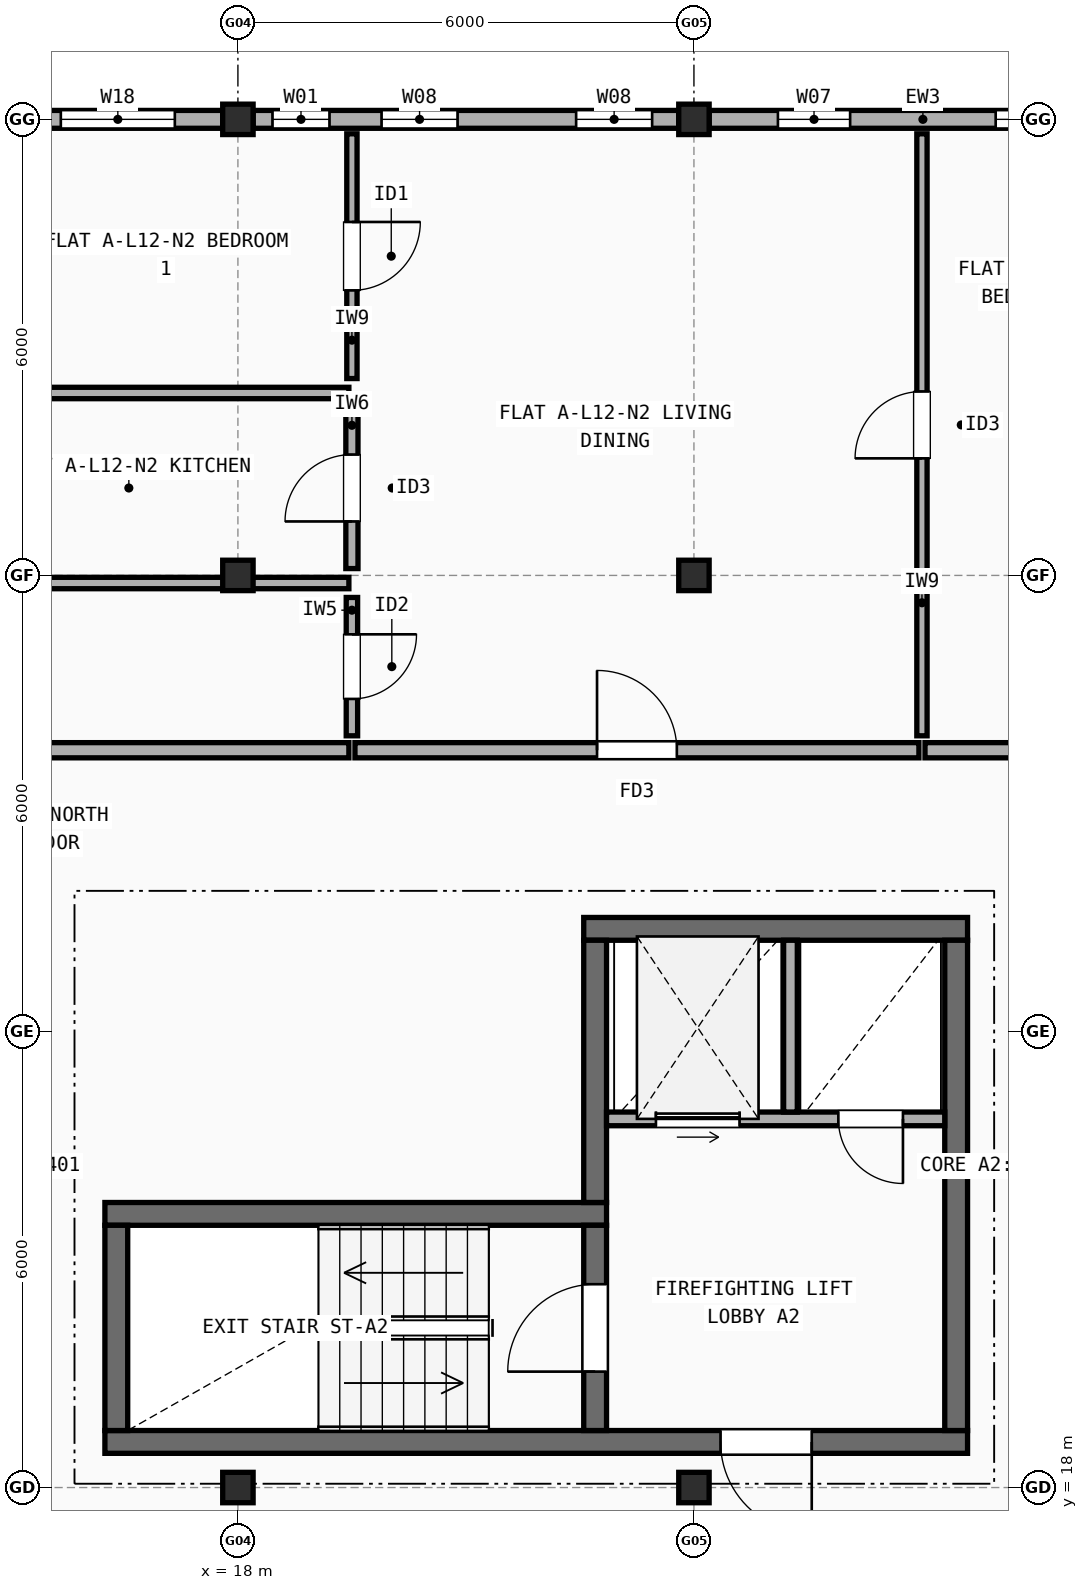
"""IFC4 building model, lengths in metres.
Left out: names, types, materials, properties, quantities, classifications, styles, units other than length and angle.
Written with IfcOpenShell. Run it as: python <this file> out.ifc"""

import sys

from ifc_helpers import new_model, si_unit, direction, frame, frame_2d, origin, origin_2d, place, context, subcontext, project, spatial, rectangle, extrude, element, fill, save


model = new_model("IFC4")
c1 = context("Model", 3, precision=1e-05, world=origin(), true_north=direction((0.0, 1.0)))
c2 = subcontext(c1, "Body", "Model", "MODEL_VIEW")
j1 = project(units=[si_unit("LENGTHUNIT", "METRE"), si_unit("PLANEANGLEUNIT", "RADIAN")], contexts=[c1])
p1 = place(None, origin())
s1 = spatial("IfcSite", under=j1, at=p1, CompositionType="ELEMENT")
p2 = place(p1, origin())
s2 = spatial("IfcBuilding", under=s1, at=p2, CompositionType="ELEMENT")
p3 = place(p2, frame((0.0, 0.0, 39.7)))
s3 = spatial("IfcBuildingStorey", under=s2, at=p3, CompositionType="ELEMENT", Elevation=39.7)
for number, where, z_axis, x_axis in (
    (1, (18.0, 18.0, 0.0), (0.0, 0.0, 1.0), (1.0, 0.0, 0.0)),
    (2, (18.0, 30.0, 0.0), (0.0, 0.0, 1.0), (1.0, 0.0, 0.0)),
    (3, (18.0, 36.0, 0.0), (0.0, 0.0, 1.0), (1.0, 0.0, 0.0)),
    (4, (24.0, 18.0, 0.0), (0.0, 0.0, 1.0), (1.0, 0.0, 0.0)),
    (5, (24.0, 30.0, 0.0), (0.0, 0.0, 1.0), (1.0, 0.0, 0.0)),
    (6, (24.0, 36.0, 0.0), (0.0, 0.0, 1.0), (1.0, 0.0, 0.0)),
):
    element("IfcColumn", number, at=place(p3, frame(where, z_axis=z_axis, x_axis=x_axis)), inside=s3, PredefinedType="COLUMN", context=c2, shape_type="SweptSolid", body=[
        extrude(rectangle(XDim=0.4, YDim=0.4, at=origin_2d()), origin(), (0.0, 0.0, 1.0), 3.0),
    ])
p4 = place(p3, frame((29.8, 36.0, 0.0), z_axis=(0.0, 0.0, 1.0), x_axis=(-1.0, 0.0, 0.0)))
e7 = element("IfcWall", 7, at=p4, inside=s3, PredefinedType="STANDARD", context=c2, shape_type="SweptSolid", body=[
    extrude(rectangle(XDim=5.6, YDim=0.235, at=frame_2d((2.8, 0.0))), origin(), (0.0, 0.0, 1.0), 2.482),
])
p5 = place(p4, frame((0.93, 0.0, 0.9)))
e8 = element("IfcOpeningElement", 8, at=p5, cuts=e7, PredefinedType="OPENING", context=c2, shape_type="SweptSolid", body=[
    extrude(rectangle(XDim=0.9, YDim=1.4, at=frame_2d((0.45, 0.7))), frame((0.0, 0.127, 0.0), z_axis=(0.0, -1.0, 0.0), x_axis=(1.0, 0.0, 0.0)), (0.0, 0.0, 1.0), 0.255),
])
p6 = place(p4, frame((3.745, 0.0, 0.9)))
e9 = element("IfcOpeningElement", 9, at=p6, cuts=e7, PredefinedType="OPENING", context=c2, shape_type="SweptSolid", body=[
    extrude(rectangle(XDim=0.95, YDim=1.35, at=frame_2d((0.475, 0.675))), frame((0.0, 0.127, 0.0), z_axis=(0.0, -1.0, 0.0), x_axis=(1.0, 0.0, 0.0)), (0.0, 0.0, 1.0), 0.255),
])
p7 = place(p3, frame((23.8, 36.0, 0.0), z_axis=(0.0, 0.0, 1.0), x_axis=(-1.0, 0.0, 0.0)))
e10 = element("IfcWall", 10, at=p7, inside=s3, PredefinedType="STANDARD", context=c2, shape_type="SweptSolid", body=[
    extrude(rectangle(XDim=5.6, YDim=0.235, at=frame_2d((2.8, 0.0))), origin(), (0.0, 0.0, 1.0), 2.482),
])
p8 = place(p7, frame((0.35, 0.0, 0.9)))
e11 = element("IfcOpeningElement", 11, at=p8, cuts=e10, PredefinedType="OPENING", context=c2, shape_type="SweptSolid", body=[
    extrude(rectangle(XDim=1.0, YDim=1.4, at=frame_2d((0.5, 0.7))), frame((0.0, 0.127, 0.0), z_axis=(0.0, -1.0, 0.0), x_axis=(1.0, 0.0, 0.0)), (0.0, 0.0, 1.0), 0.255),
])
p9 = place(p7, frame((2.91, 0.0, 0.9)))
e12 = element("IfcOpeningElement", 12, at=p9, cuts=e10, PredefinedType="OPENING", context=c2, shape_type="SweptSolid", body=[
    extrude(rectangle(XDim=1.0, YDim=1.4, at=frame_2d((0.5, 0.7))), frame((0.0, 0.127, 0.0), z_axis=(0.0, -1.0, 0.0), x_axis=(1.0, 0.0, 0.0)), (0.0, 0.0, 1.0), 0.255),
])
p10 = place(p7, frame((4.595, 0.0, 0.9)))
e13 = element("IfcOpeningElement", 13, at=p10, cuts=e10, PredefinedType="OPENING", context=c2, shape_type="SweptSolid", body=[
    extrude(rectangle(XDim=0.75, YDim=1.15, at=frame_2d((0.375, 0.575))), frame((0.0, 0.127, 0.0), z_axis=(0.0, -1.0, 0.0), x_axis=(1.0, 0.0, 0.0)), (0.0, 0.0, 1.0), 0.255),
])
p11 = place(p3, frame((17.8, 36.0, 0.0), z_axis=(0.0, 0.0, 1.0), x_axis=(-1.0, 0.0, 0.0)))
e14 = element("IfcWall", 14, at=p11, inside=s3, PredefinedType="STANDARD", context=c2, shape_type="SweptSolid", body=[
    extrude(rectangle(XDim=5.6, YDim=0.235, at=frame_2d((2.8, 0.0))), origin(), (0.0, 0.0, 1.0), 2.482),
])
p12 = place(p11, frame((0.63, 0.0, 0.9)))
e15 = element("IfcOpeningElement", 15, at=p12, cuts=e14, PredefinedType="OPENING", context=c2, shape_type="SweptSolid", body=[
    extrude(rectangle(XDim=1.5, YDim=1.4, at=frame_2d((0.75, 0.7))), frame((0.0, 0.127, 0.0), z_axis=(0.0, -1.0, 0.0), x_axis=(1.0, 0.0, 0.0)), (0.0, 0.0, 1.0), 0.255),
])
p13 = place(p11, frame((3.77, 0.0, 0.9)))
e16 = element("IfcOpeningElement", 16, at=p13, cuts=e14, PredefinedType="OPENING", context=c2, shape_type="SweptSolid", body=[
    extrude(rectangle(XDim=0.9, YDim=1.4, at=frame_2d((0.45, 0.7))), frame((0.0, 0.127, 0.0), z_axis=(0.0, -1.0, 0.0), x_axis=(1.0, 0.0, 0.0)), (0.0, 0.0, 1.0), 0.255),
])
p14 = place(p3, frame((16.25, 18.6, 0.0), z_axis=(0.0, 0.0, 1.0), x_axis=(1.0, 0.0, 0.0)))
e17 = element("IfcWall", 17, at=p14, inside=s3, PredefinedType="SHEAR", context=c2, shape_type="SweptSolid", body=[
    extrude(rectangle(XDim=11.35, YDim=0.3, at=frame_2d((5.675, 0.0))), origin(), (0.0, 0.0, 1.0), 3.0),
])
p15 = place(p14, frame((8.1, 0.0, 0.0)))
e18 = element("IfcOpeningElement", 18, at=p15, cuts=e17, PredefinedType="OPENING", context=c2, shape_type="SweptSolid", body=[
    extrude(rectangle(XDim=1.2, YDim=2.15, at=frame_2d((0.6, 1.075))), frame((0.0, 0.16, 0.0), z_axis=(0.0, -1.0, 0.0), x_axis=(1.0, 0.0, 0.0)), (0.0, 0.0, 1.0), 0.32),
])
p16 = place(p3, frame((22.85, 21.6, 0.0), z_axis=(0.0, 0.0, 1.0), x_axis=(-1.0, 0.0, 0.0)))
e19 = element("IfcWall", 19, at=p16, inside=s3, PredefinedType="SHEAR", context=c2, shape_type="SweptSolid", body=[
    extrude(rectangle(XDim=6.6, YDim=0.3, at=frame_2d((3.3, 0.0))), origin(), (0.0, 0.0, 1.0), 3.0),
])
p17 = place(p3, frame((16.4, 21.45, 0.0), z_axis=(0.0, 0.0, 1.0), x_axis=(0.0, -1.0, 0.0)))
e20 = element("IfcWall", 20, at=p17, inside=s3, PredefinedType="SHEAR", context=c2, shape_type="SweptSolid", body=[
    extrude(rectangle(XDim=2.7, YDim=0.3, at=frame_2d((1.35, 0.0))), origin(), (0.0, 0.0, 1.0), 3.0),
])
p18 = place(p3, frame((22.7, 18.75, 0.0), z_axis=(0.0, 0.0, 1.0), x_axis=(0.0, 1.0, 0.0)))
e21 = element("IfcWall", 21, at=p18, inside=s3, PredefinedType="SHEAR", context=c2, shape_type="SweptSolid", body=[
    extrude(rectangle(XDim=2.7, YDim=0.3, at=frame_2d((1.35, 0.0))), origin(), (0.0, 0.0, 1.0), 3.0),
])
p19 = place(p18, frame((0.775, 0.0, 0.0)))
e22 = element("IfcOpeningElement", 22, at=p19, cuts=e21, PredefinedType="OPENING", context=c2, shape_type="SweptSolid", body=[
    extrude(rectangle(XDim=1.15, YDim=2.15, at=frame_2d((0.575, 1.075))), frame((0.0, 0.16, 0.0), z_axis=(0.0, -1.0, 0.0), x_axis=(1.0, 0.0, 0.0)), (0.0, 0.0, 1.0), 0.32),
])
p20 = place(p3, frame((27.6, 25.35, 0.0), z_axis=(0.0, 0.0, 1.0), x_axis=(-1.0, 0.0, 0.0)))
e23 = element("IfcWall", 23, at=p20, inside=s3, PredefinedType="SHEAR", context=c2, shape_type="SweptSolid", body=[
    extrude(rectangle(XDim=5.05, YDim=0.3, at=frame_2d((2.525, 0.0))), origin(), (0.0, 0.0, 1.0), 3.0),
])
p21 = place(p3, frame((27.45, 18.75, 0.0), z_axis=(0.0, 0.0, 1.0), x_axis=(0.0, 1.0, 0.0)))
e24 = element("IfcWall", 24, at=p21, inside=s3, PredefinedType="SHEAR", context=c2, shape_type="SweptSolid", body=[
    extrude(rectangle(XDim=6.45, YDim=0.3, at=frame_2d((3.225, 0.0))), origin(), (0.0, 0.0, 1.0), 3.0),
])
p22 = place(p3, frame((22.7, 21.75, 0.0), z_axis=(0.0, 0.0, 1.0), x_axis=(0.0, 1.0, 0.0)))
e25 = element("IfcWall", 25, at=p22, inside=s3, PredefinedType="SHEAR", context=c2, shape_type="SweptSolid", body=[
    extrude(rectangle(XDim=3.45, YDim=0.3, at=frame_2d((1.725, 0.0))), origin(), (0.0, 0.0, 1.0), 3.0),
])
p23 = place(p3, frame((22.85, 22.85, 0.0), z_axis=(0.0, 0.0, 1.0), x_axis=(1.0, 0.0, 0.0)))
e26 = element("IfcWall", 26, at=p23, inside=s3, PredefinedType="SOLIDWALL", context=c2, shape_type="SweptSolid", body=[
    extrude(rectangle(XDim=4.45, YDim=0.18, at=frame_2d((2.225, 0.0))), origin(), (0.0, 0.0, 1.0), 3.0),
])
p24 = place(p23, frame((0.65, 0.0, 0.0)))
e27 = element("IfcOpeningElement", 27, at=p24, cuts=e26, PredefinedType="OPENING", context=c2, shape_type="SweptSolid", body=[
    extrude(rectangle(XDim=1.1, YDim=2.15, at=frame_2d((0.55, 1.075))), frame((0.0, 0.1, 0.0), z_axis=(0.0, -1.0, 0.0), x_axis=(1.0, 0.0, 0.0)), (0.0, 0.0, 1.0), 0.2),
])
p25 = place(p23, frame((3.05, 0.0, 0.0)))
e28 = element("IfcOpeningElement", 28, at=p25, cuts=e26, PredefinedType="OPENING", context=c2, shape_type="SweptSolid", body=[
    extrude(rectangle(XDim=0.85, YDim=2.1, at=frame_2d((0.425, 1.05))), frame((0.0, 0.1, 0.0), z_axis=(0.0, -1.0, 0.0), x_axis=(1.0, 0.0, 0.0)), (0.0, 0.0, 1.0), 0.2),
])
p26 = place(p3, frame((25.27, 22.94, 0.0), z_axis=(0.0, 0.0, 1.0), x_axis=(0.0, 1.0, 0.0)))
e29 = element("IfcWall", 29, at=p26, inside=s3, PredefinedType="SOLIDWALL", context=c2, shape_type="SweptSolid", body=[
    extrude(rectangle(XDim=2.26, YDim=0.18, at=frame_2d((1.13, 0.0))), origin(), (0.0, 0.0, 1.0), 3.0),
])
p27 = place(p3, frame((15.04, 27.7, 0.0), z_axis=(0.0, 0.0, 1.0), x_axis=(1.0, 0.0, 0.0)))
e30 = element("IfcWall", 30, at=p27, inside=s3, PredefinedType="SOLIDWALL", context=c2, shape_type="SweptSolid", body=[
    extrude(rectangle(XDim=4.42, YDim=0.2, at=frame_2d((2.21, 0.0))), origin(), (0.0, 0.0, 1.0), 3.0),
])
p28 = place(p3, frame((19.54, 27.7, 0.0), z_axis=(0.0, 0.0, 1.0), x_axis=(1.0, 0.0, 0.0)))
e31 = element("IfcWall", 31, at=p28, inside=s3, PredefinedType="SOLIDWALL", context=c2, shape_type="SweptSolid", body=[
    extrude(rectangle(XDim=7.42, YDim=0.2, at=frame_2d((3.71, 0.0))), origin(), (0.0, 0.0, 1.0), 3.0),
])
p29 = place(p28, frame((3.185, 0.0, 0.0)))
e32 = element("IfcOpeningElement", 32, at=p29, cuts=e31, PredefinedType="OPENING", context=c2, shape_type="SweptSolid", body=[
    extrude(rectangle(XDim=1.05, YDim=2.15, at=frame_2d((0.525, 1.075))), frame((0.0, 0.11, 0.0), z_axis=(0.0, -1.0, 0.0), x_axis=(1.0, 0.0, 0.0)), (0.0, 0.0, 1.0), 0.22),
])
p30 = place(p3, frame((19.5, 32.59, 0.0), z_axis=(0.0, 0.0, 1.0), x_axis=(0.0, 1.0, 0.0)))
e33 = element("IfcWall", 33, at=p30, inside=s3, PredefinedType="PARTITIONING", context=c2, shape_type="SweptSolid", body=[
    extrude(rectangle(XDim=3.22, YDim=0.135, at=frame_2d((1.61, 0.0))), origin(), (0.0, 0.0, 1.0), 3.0),
])
p31 = place(p30, frame((1.16, 0.0, 0.0)))
e34 = element("IfcOpeningElement", 34, at=p31, cuts=e33, PredefinedType="OPENING", context=c2, shape_type="SweptSolid", body=[
    extrude(rectangle(XDim=0.9, YDim=2.1, at=frame_2d((0.45, 1.05))), frame((0.0, 0.077, 0.0), z_axis=(0.0, -1.0, 0.0), x_axis=(1.0, 0.0, 0.0)), (0.0, 0.0, 1.0), 0.155),
])
p32 = place(p3, frame((19.5, 30.09, 0.0), z_axis=(0.0, 0.0, 1.0), x_axis=(0.0, 1.0, 0.0)))
e35 = element("IfcWall", 35, at=p32, inside=s3, PredefinedType="PLUMBINGWALL", context=c2, shape_type="SweptSolid", body=[
    extrude(rectangle(XDim=2.12, YDim=0.16, at=frame_2d((1.06, 0.0))), origin(), (0.0, 0.0, 1.0), 2.532),
])
p33 = place(p32, frame((0.62, 0.0, 0.0)))
e36 = element("IfcOpeningElement", 36, at=p33, cuts=e35, PredefinedType="OPENING", context=c2, shape_type="SweptSolid", body=[
    extrude(rectangle(XDim=0.88, YDim=2.1, at=frame_2d((0.44, 1.05))), frame((0.0, 0.09, 0.0), z_axis=(0.0, -1.0, 0.0), x_axis=(1.0, 0.0, 0.0)), (0.0, 0.0, 1.0), 0.18),
])
p34 = place(p3, frame((19.5, 27.89, 0.0), z_axis=(0.0, 0.0, 1.0), x_axis=(0.0, 1.0, 0.0)))
e37 = element("IfcWall", 37, at=p34, inside=s3, PredefinedType="PARTITIONING", context=c2, shape_type="SweptSolid", body=[
    extrude(rectangle(XDim=1.82, YDim=0.15, at=frame_2d((0.91, 0.0))), origin(), (0.0, 0.0, 1.0), 3.0),
])
p35 = place(p34, frame((0.485, 0.0, 0.0)))
e38 = element("IfcOpeningElement", 38, at=p35, cuts=e37, PredefinedType="OPENING", context=c2, shape_type="SweptSolid", body=[
    extrude(rectangle(XDim=0.85, YDim=2.1, at=frame_2d((0.425, 1.05))), frame((0.0, 0.085, 0.0), z_axis=(0.0, -1.0, 0.0), x_axis=(1.0, 0.0, 0.0)), (0.0, 0.0, 1.0), 0.17),
])
p36 = place(p3, frame((15.04, 32.4, 0.0), z_axis=(0.0, 0.0, 1.0), x_axis=(1.0, 0.0, 0.0)))
e39 = element("IfcWall", 39, at=p36, inside=s3, PredefinedType="PARTITIONING", context=c2, shape_type="SweptSolid", body=[
    extrude(rectangle(XDim=4.42, YDim=0.15, at=frame_2d((2.21, 0.0))), origin(), (0.0, 0.0, 1.0), 2.508),
])
p37 = place(p3, frame((15.04, 29.9, 0.0), z_axis=(0.0, 0.0, 1.0), x_axis=(1.0, 0.0, 0.0)))
e40 = element("IfcWall", 40, at=p37, inside=s3, PredefinedType="PARTITIONING", context=c2, shape_type="SweptSolid", body=[
    extrude(rectangle(XDim=4.42, YDim=0.15, at=frame_2d((2.21, 0.0))), origin(), (0.0, 0.0, 1.0), 2.532),
])
p38 = place(p3, frame((27.04, 27.7, 0.0), z_axis=(0.0, 0.0, 1.0), x_axis=(1.0, 0.0, 0.0)))
e41 = element("IfcWall", 41, at=p38, inside=s3, PredefinedType="SOLIDWALL", context=c2, shape_type="SweptSolid", body=[
    extrude(rectangle(XDim=2.92, YDim=0.2, at=frame_2d((1.46, 0.0))), origin(), (0.0, 0.0, 1.0), 2.482),
])
p39 = place(p3, frame((27.0, 27.89, 0.0), z_axis=(0.0, 0.0, 1.0), x_axis=(0.0, 1.0, 0.0)))
e42 = element("IfcWall", 42, at=p39, inside=s3, PredefinedType="PARTITIONING", context=c2, shape_type="SweptSolid", body=[
    extrude(rectangle(XDim=7.92, YDim=0.135, at=frame_2d((3.96, 0.0))), origin(), (0.0, 0.0, 1.0), 2.532),
])
p40 = place(p39, frame((3.65, 0.0, 0.0)))
e43 = element("IfcOpeningElement", 43, at=p40, cuts=e42, PredefinedType="OPENING", context=c2, shape_type="SweptSolid", body=[
    extrude(rectangle(XDim=0.88, YDim=2.1, at=frame_2d((0.44, 1.05))), frame((0.0, 0.077, 0.0), z_axis=(0.0, -1.0, 0.0), x_axis=(1.0, 0.0, 0.0)), (0.0, 0.0, 1.0), 0.155),
])
p41 = place(p5, origin())
e44 = element("IfcWindow", 44, at=p41, inside=s3, PartitioningType="SINGLE_PANEL", PredefinedType="WINDOW", context=c2, shape_type="SweptSolid", body=[
    extrude(rectangle(XDim=0.9, YDim=1.4, at=frame_2d((0.45, 0.7))), frame((0.0, 0.03, 0.0), z_axis=(0.0, -1.0, 0.0), x_axis=(1.0, 0.0, 0.0)), (0.0, 0.0, 1.0), 0.06),
])
fill(e8, e44)
p42 = place(p6, origin())
e45 = element("IfcWindow", 45, at=p42, inside=s3, PartitioningType="SINGLE_PANEL", PredefinedType="WINDOW", context=c2, shape_type="SweptSolid", body=[
    extrude(rectangle(XDim=0.95, YDim=1.35, at=frame_2d((0.475, 0.675))), frame((0.0, 0.03, 0.0), z_axis=(0.0, -1.0, 0.0), x_axis=(1.0, 0.0, 0.0)), (0.0, 0.0, 1.0), 0.06),
])
fill(e9, e45)
p43 = place(p8, origin())
e46 = element("IfcWindow", 46, at=p43, inside=s3, PartitioningType="SINGLE_PANEL", PredefinedType="WINDOW", context=c2, shape_type="SweptSolid", body=[
    extrude(rectangle(XDim=1.0, YDim=1.4, at=frame_2d((0.5, 0.7))), frame((0.0, 0.03, 0.0), z_axis=(0.0, -1.0, 0.0), x_axis=(1.0, 0.0, 0.0)), (0.0, 0.0, 1.0), 0.06),
])
fill(e11, e46)
p44 = place(p9, origin())
e47 = element("IfcWindow", 47, at=p44, inside=s3, PartitioningType="SINGLE_PANEL", PredefinedType="WINDOW", context=c2, shape_type="SweptSolid", body=[
    extrude(rectangle(XDim=1.0, YDim=1.4, at=frame_2d((0.5, 0.7))), frame((0.0, 0.03, 0.0), z_axis=(0.0, -1.0, 0.0), x_axis=(1.0, 0.0, 0.0)), (0.0, 0.0, 1.0), 0.06),
])
fill(e12, e47)
p45 = place(p10, origin())
e48 = element("IfcWindow", 48, at=p45, inside=s3, PartitioningType="SINGLE_PANEL", PredefinedType="WINDOW", context=c2, shape_type="SweptSolid", body=[
    extrude(rectangle(XDim=0.75, YDim=1.15, at=frame_2d((0.375, 0.575))), frame((0.0, 0.03, 0.0), z_axis=(0.0, -1.0, 0.0), x_axis=(1.0, 0.0, 0.0)), (0.0, 0.0, 1.0), 0.06),
])
fill(e13, e48)
p46 = place(p12, origin())
e49 = element("IfcWindow", 49, at=p46, inside=s3, PartitioningType="SINGLE_PANEL", PredefinedType="WINDOW", context=c2, shape_type="SweptSolid", body=[
    extrude(rectangle(XDim=1.5, YDim=1.4, at=frame_2d((0.75, 0.7))), frame((0.0, 0.03, 0.0), z_axis=(0.0, -1.0, 0.0), x_axis=(1.0, 0.0, 0.0)), (0.0, 0.0, 1.0), 0.06),
])
fill(e15, e49)
p47 = place(p15, origin())
e50 = element("IfcDoor", 50, at=p47, inside=s3, OperationType="SINGLE_SWING_RIGHT", PredefinedType="DOOR", context=c2, shape_type="SweptSolid", body=[
    extrude(rectangle(XDim=1.2, YDim=2.15, at=frame_2d((0.6, 1.075))), frame((0.0, 0.025, 0.0), z_axis=(0.0, -1.0, 0.0), x_axis=(1.0, 0.0, 0.0)), (0.0, 0.0, 1.0), 0.05),
])
fill(e18, e50)
p48 = place(p19, origin())
e51 = element("IfcDoor", 51, at=p48, inside=s3, OperationType="SINGLE_SWING_LEFT", PredefinedType="DOOR", context=c2, shape_type="SweptSolid", body=[
    extrude(rectangle(XDim=1.15, YDim=2.15, at=frame_2d((0.575, 1.075))), frame((0.0, 0.025, 0.0), z_axis=(0.0, -1.0, 0.0), x_axis=(1.0, 0.0, 0.0)), (0.0, 0.0, 1.0), 0.05),
])
fill(e22, e51)
p49 = place(p24, origin())
e52 = element("IfcDoor", 52, at=p49, inside=s3, OperationType="SLIDING_TO_LEFT", PredefinedType="DOOR", context=c2, shape_type="SweptSolid", body=[
    extrude(rectangle(XDim=1.1, YDim=2.15, at=frame_2d((0.55, 1.075))), frame((0.0, 0.025, 0.0), z_axis=(0.0, -1.0, 0.0), x_axis=(1.0, 0.0, 0.0)), (0.0, 0.0, 1.0), 0.05),
])
fill(e27, e52)
p50 = place(p25, frame((0.85, 0.0, 0.0), z_axis=(0.0, 0.0, 1.0), x_axis=(-1.0, 0.0, 0.0)))
e53 = element("IfcDoor", 53, at=p50, inside=s3, OperationType="SINGLE_SWING_RIGHT", PredefinedType="DOOR", context=c2, shape_type="SweptSolid", body=[
    extrude(rectangle(XDim=0.85, YDim=2.1, at=frame_2d((0.425, 1.05))), frame((0.0, 0.025, 0.0), z_axis=(0.0, -1.0, 0.0), x_axis=(1.0, 0.0, 0.0)), (0.0, 0.0, 1.0), 0.05),
])
fill(e28, e53)
p51 = place(p29, origin())
e54 = element("IfcDoor", 54, at=p51, inside=s3, OperationType="SINGLE_SWING_LEFT", PredefinedType="DOOR", context=c2, shape_type="SweptSolid", body=[
    extrude(rectangle(XDim=1.05, YDim=2.15, at=frame_2d((0.525, 1.075))), frame((0.0, 0.025, 0.0), z_axis=(0.0, -1.0, 0.0), x_axis=(1.0, 0.0, 0.0)), (0.0, 0.0, 1.0), 0.05),
])
fill(e32, e54)
p52 = place(p31, origin())
e55 = element("IfcDoor", 55, at=p52, inside=s3, OperationType="SINGLE_SWING_RIGHT", PredefinedType="DOOR", context=c2, shape_type="SweptSolid", body=[
    extrude(rectangle(XDim=0.9, YDim=2.1, at=frame_2d((0.45, 1.05))), frame((0.0, 0.025, 0.0), z_axis=(0.0, -1.0, 0.0), x_axis=(1.0, 0.0, 0.0)), (0.0, 0.0, 1.0), 0.05),
])
fill(e34, e55)
p53 = place(p33, origin())
e56 = element("IfcDoor", 56, at=p53, inside=s3, OperationType="SINGLE_SWING_LEFT", PredefinedType="DOOR", context=c2, shape_type="SweptSolid", body=[
    extrude(rectangle(XDim=0.88, YDim=2.1, at=frame_2d((0.44, 1.05))), frame((0.0, 0.025, 0.0), z_axis=(0.0, -1.0, 0.0), x_axis=(1.0, 0.0, 0.0)), (0.0, 0.0, 1.0), 0.05),
])
fill(e36, e56)
p54 = place(p35, origin())
e57 = element("IfcDoor", 57, at=p54, inside=s3, OperationType="SINGLE_SWING_RIGHT", PredefinedType="DOOR", context=c2, shape_type="SweptSolid", body=[
    extrude(rectangle(XDim=0.85, YDim=2.1, at=frame_2d((0.425, 1.05))), frame((0.0, 0.025, 0.0), z_axis=(0.0, -1.0, 0.0), x_axis=(1.0, 0.0, 0.0)), (0.0, 0.0, 1.0), 0.05),
])
fill(e38, e57)
p55 = place(p40, origin())
e58 = element("IfcDoor", 58, at=p55, inside=s3, OperationType="SINGLE_SWING_LEFT", PredefinedType="DOOR", context=c2, shape_type="SweptSolid", body=[
    extrude(rectangle(XDim=0.88, YDim=2.1, at=frame_2d((0.44, 1.05))), frame((0.0, 0.025, 0.0), z_axis=(0.0, -1.0, 0.0), x_axis=(1.0, 0.0, 0.0)), (0.0, 0.0, 1.0), 0.05),
])
fill(e43, e58)
save(model, sys.argv[1])
